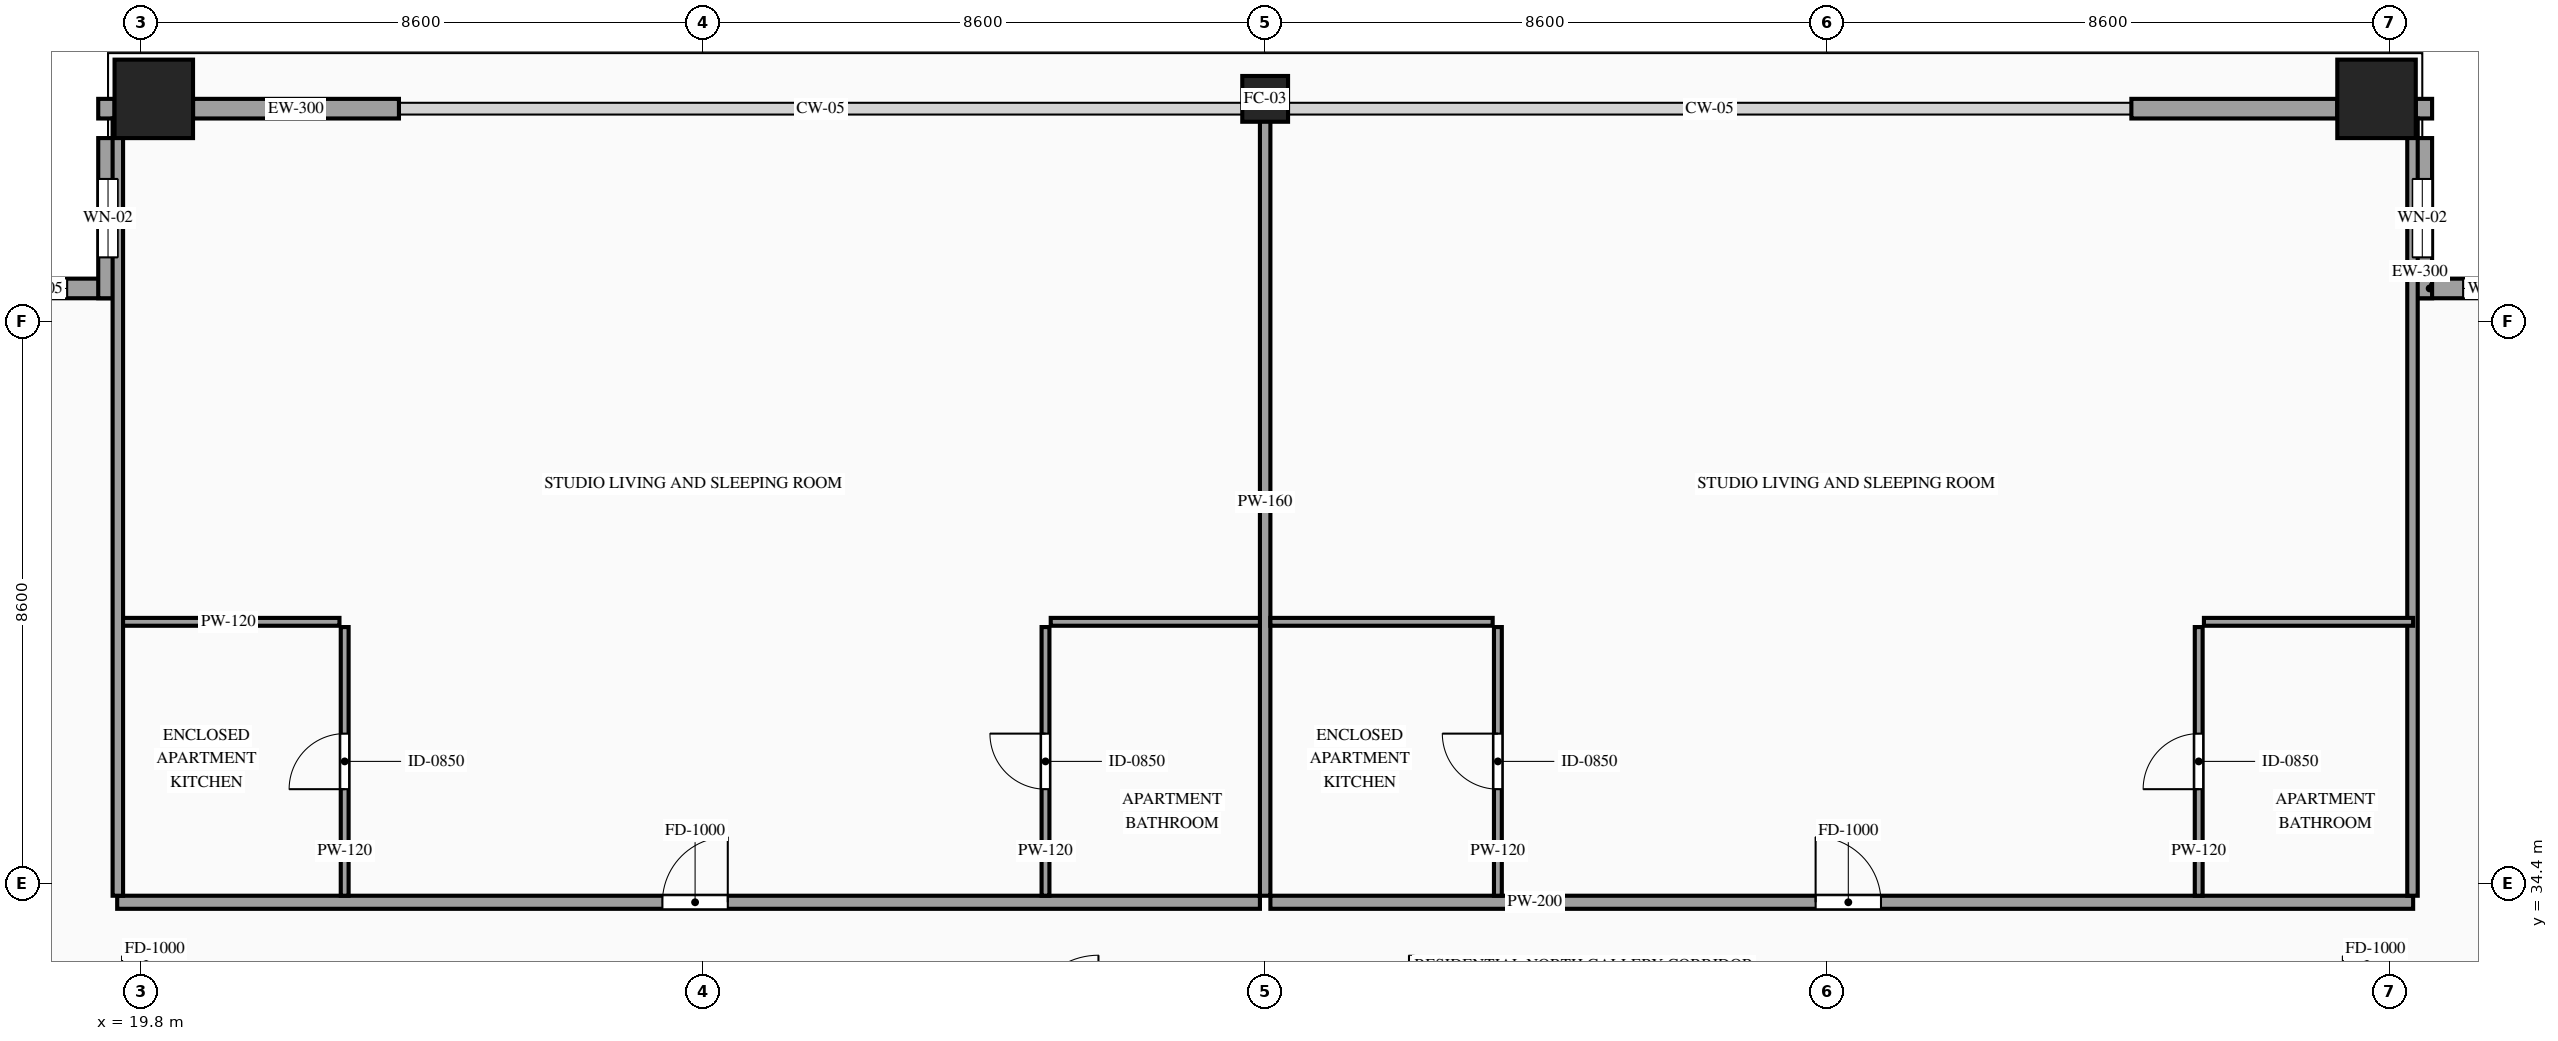
"""IFC4 building model, lengths in metres.
Left out: names, types, materials, properties, quantities, classifications, styles, units other than length and angle.
Written with IfcOpenShell. Run it as: python <this file> out.ifc"""

import sys

from ifc_helpers import new_model, si_unit, direction, frame, frame_2d, origin, origin_2d, place, context, subcontext, project, spatial, rectangle, hollow_rectangle, extrude, source, transform, mapped, element, fill, save


model = new_model("IFC4")
c1 = context("Model", 3, precision=1e-05, world=origin(), true_north=direction((0.0, 1.0)))
c2 = subcontext(c1, "Body", "Model", "MODEL_VIEW")
j1 = project(units=[si_unit("LENGTHUNIT", "METRE"), si_unit("PLANEANGLEUNIT", "RADIAN")], contexts=[c1])
p1 = place(None, origin())
s1 = spatial("IfcSite", under=j1, at=p1, CompositionType="ELEMENT")
p2 = place(p1, origin())
s2 = spatial("IfcBuilding", under=s1, at=p2, CompositionType="ELEMENT")
p3 = place(p2, frame((0.0, 0.0, 231.1)))
s3 = spatial("IfcBuildingStorey", under=s2, at=p3, CompositionType="ELEMENT", Elevation=231.1)
m1 = source(origin(), c2, "Body", "SweptSolid", [
    extrude(hollow_rectangle(XDim=1.2, YDim=1.2, WallThickness=0.055, at=origin_2d()), origin(), (0.0, 0.0, 1.0), 3.5),
])
p4 = place(p3, frame((20.0, 46.4, 0.0), z_axis=(0.0, 0.0, 1.0), x_axis=(1.0, 0.0, 0.0)))
e1 = element("IfcColumn", 1, at=p4, inside=s3, PredefinedType="COLUMN", context=c2, shape_type="MappedRepresentation", body=[
    mapped(m1, transform((0.0, 0.0, 0.0), scale=1.0)),
])
m2 = source(origin(), c2, "Body", "SweptSolid", [
    extrude(hollow_rectangle(XDim=0.7, YDim=0.7, WallThickness=0.032, at=origin_2d()), origin(), (0.0, 0.0, 1.0), 3.5),
])
p5 = place(p3, frame((37.0, 46.4, 0.0), z_axis=(0.0, 0.0, 1.0), x_axis=(1.0, 0.0, 0.0)))
e2 = element("IfcColumn", 2, at=p5, inside=s3, PredefinedType="COLUMN", context=c2, shape_type="MappedRepresentation", body=[
    mapped(m2, transform((0.0, 0.0, 0.0), scale=1.0)),
])
p6 = place(p3, frame((54.0, 46.4, 0.0), z_axis=(0.0, 0.0, 1.0), x_axis=(1.0, 0.0, 0.0)))
e3 = element("IfcColumn", 3, at=p6, inside=s3, PredefinedType="COLUMN", context=c2, shape_type="MappedRepresentation", body=[
    mapped(m1, transform((0.0, 0.0, 0.0), scale=1.0)),
])
p7 = place(p3, frame((19.45, 43.5, 0.0), z_axis=(0.0, 0.0, 1.0), x_axis=(-1.0, 0.0, 0.0)))
e4 = element("IfcWall", 4, at=p7, inside=s3, PredefinedType="SOLIDWALL", context=c2, shape_type="SweptSolid", body=[
    extrude(rectangle(XDim=2.45, YDim=0.3, at=frame_2d((1.225, 0.0))), origin(), (0.0, 0.0, 1.0), 3.28),
])
p8 = place(p7, frame((0.775, 0.0, 0.85)))
e5 = element("IfcOpeningElement", 5, at=p8, cuts=e4, PredefinedType="OPENING", context=c2, shape_type="SweptSolid", body=[
    extrude(rectangle(XDim=0.9, YDim=1.5, at=frame_2d((0.45, 0.75))), frame((0.0, 0.165, 0.0), z_axis=(0.0, -1.0, 0.0), x_axis=(1.0, 0.0, 0.0)), (0.0, 0.0, 1.0), 0.33),
])
p9 = place(p3, frame((19.3, 45.8, 0.0), z_axis=(0.0, 0.0, 1.0), x_axis=(0.0, -1.0, 0.0)))
e6 = element("IfcWall", 6, at=p9, inside=s3, PredefinedType="SOLIDWALL", context=c2, shape_type="SweptSolid", body=[
    extrude(rectangle(XDim=2.45, YDim=0.3, at=frame_2d((1.225, 0.0))), origin(), (0.0, 0.0, 1.0), 3.28),
])
p10 = place(p9, frame((0.625, 0.0, 0.85)))
e7 = element("IfcOpeningElement", 7, at=p10, cuts=e6, PredefinedType="OPENING", context=c2, shape_type="SweptSolid", body=[
    extrude(rectangle(XDim=1.2, YDim=2.1, at=frame_2d((0.6, 1.05))), frame((0.0, 0.165, 0.0), z_axis=(0.0, -1.0, 0.0), x_axis=(1.0, 0.0, 0.0)), (0.0, 0.0, 1.0), 0.33),
])
p11 = place(p3, frame((57.0, 43.5, 0.0), z_axis=(0.0, 0.0, 1.0), x_axis=(-1.0, 0.0, 0.0)))
e8 = element("IfcWall", 8, at=p11, inside=s3, PredefinedType="SOLIDWALL", context=c2, shape_type="SweptSolid", body=[
    extrude(rectangle(XDim=2.45, YDim=0.3, at=frame_2d((1.225, 0.0))), origin(), (0.0, 0.0, 1.0), 3.28),
])
p12 = place(p11, frame((0.775, 0.0, 0.85)))
e9 = element("IfcOpeningElement", 9, at=p12, cuts=e8, PredefinedType="OPENING", context=c2, shape_type="SweptSolid", body=[
    extrude(rectangle(XDim=0.9, YDim=1.5, at=frame_2d((0.45, 0.75))), frame((0.0, 0.165, 0.0), z_axis=(0.0, -1.0, 0.0), x_axis=(1.0, 0.0, 0.0)), (0.0, 0.0, 1.0), 0.33),
])
p13 = place(p3, frame((54.7, 43.35, 0.0), z_axis=(0.0, 0.0, 1.0), x_axis=(0.0, 1.0, 0.0)))
e10 = element("IfcWall", 10, at=p13, inside=s3, PredefinedType="SOLIDWALL", context=c2, shape_type="SweptSolid", body=[
    extrude(rectangle(XDim=2.45, YDim=0.3, at=frame_2d((1.225, 0.0))), origin(), (0.0, 0.0, 1.0), 3.28),
])
p14 = place(p13, frame((0.625, 0.0, 0.85)))
e11 = element("IfcOpeningElement", 11, at=p14, cuts=e10, PredefinedType="OPENING", context=c2, shape_type="SweptSolid", body=[
    extrude(rectangle(XDim=1.2, YDim=2.1, at=frame_2d((0.6, 1.05))), frame((0.0, 0.165, 0.0), z_axis=(0.0, -1.0, 0.0), x_axis=(1.0, 0.0, 0.0)), (0.0, 0.0, 1.0), 0.33),
])
m3 = source(origin(), c2, "Body", "SweptSolid", [
    extrude(rectangle(XDim=0.25, YDim=0.3, at=frame_2d((0.125, 0.0))), origin(), (0.0, 0.0, 1.0), 3.28),
])
for number, where, z_axis, x_axis in (
    (12, (19.15, 46.25, 0.0), (0.0, 0.0, 1.0), (1.0, 0.0, 0.0)),
    (13, (54.6, 46.25, 0.0), (0.0, 0.0, 1.0), (1.0, 0.0, 0.0)),
):
    element("IfcWall", number, at=place(p3, frame(where, z_axis=z_axis, x_axis=x_axis)), inside=s3, PredefinedType="SOLIDWALL", context=c2, shape_type="MappedRepresentation", body=[
        mapped(m3, transform((0.0, 0.0, 0.0), scale=1.0)),
    ])
m4 = source(origin(), c2, "Body", "SweptSolid", [
    extrude(rectangle(XDim=3.15, YDim=0.3, at=frame_2d((1.575, 0.0))), origin(), (0.0, 0.0, 1.0), 2.835),
])
for number, where, z_axis, x_axis in (
    (14, (20.6, 46.25, 0.0), (0.0, 0.0, 1.0), (1.0, 0.0, 0.0)),
    (15, (50.25, 46.25, 0.0), (0.0, 0.0, 1.0), (1.0, 0.0, 0.0)),
):
    element("IfcWall", number, at=place(p3, frame(where, z_axis=z_axis, x_axis=x_axis)), inside=s3, PredefinedType="SOLIDWALL", context=c2, shape_type="MappedRepresentation", body=[
        mapped(m4, transform((0.0, 0.0, 0.0), scale=1.0)),
    ])
p15 = place(p3, frame((19.44, 34.11, 0.0), z_axis=(0.0, 0.0, 1.0), x_axis=(1.0, 0.0, 0.0)))
e16 = element("IfcWall", 16, at=p15, inside=s3, PredefinedType="PARTITIONING", context=c2, shape_type="SweptSolid", body=[
    extrude(rectangle(XDim=17.48, YDim=0.2, at=frame_2d((8.74, 0.0))), origin(), (0.0, 0.0, 1.0), 3.28),
])
p16 = place(p15, frame((8.34, 0.0, 0.0)))
e17 = element("IfcOpeningElement", 17, at=p16, cuts=e16, PredefinedType="OPENING", context=c2, shape_type="SweptSolid", body=[
    extrude(rectangle(XDim=1.0, YDim=2.2, at=frame_2d((0.5, 1.1))), frame((0.0, 0.115, 0.0), z_axis=(0.0, -1.0, 0.0), x_axis=(1.0, 0.0, 0.0)), (0.0, 0.0, 1.0), 0.23),
])
m5 = source(origin(), c2, "Body", "SweptSolid", [
    extrude(rectangle(XDim=12.04, YDim=0.16, at=frame_2d((6.02, 0.0))), origin(), (0.0, 0.0, 1.0), 2.787),
])
p17 = place(p3, frame((37.0, 34.21, 0.0), z_axis=(0.0, 0.0, 1.0), x_axis=(0.0, 1.0, 0.0)))
e18 = element("IfcWall", 18, at=p17, inside=s3, PredefinedType="PARTITIONING", context=c2, shape_type="MappedRepresentation", body=[
    mapped(m5, transform((0.0, 0.0, 0.0), scale=1.0)),
])
m6 = source(origin(), c2, "Body", "SweptSolid", [
    extrude(rectangle(XDim=3.4, YDim=0.12, at=frame_2d((1.7, 0.0))), origin(), (0.0, 0.0, 1.0), 3.28),
])
p18 = place(p3, frame((19.44, 38.4, 0.0), z_axis=(0.0, 0.0, 1.0), x_axis=(1.0, 0.0, 0.0)))
e19 = element("IfcWall", 19, at=p18, inside=s3, PredefinedType="PARTITIONING", context=c2, shape_type="MappedRepresentation", body=[
    mapped(m6, transform((0.0, 0.0, 0.0), scale=1.0)),
])
p19 = place(p3, frame((22.92, 34.21, 0.0), z_axis=(0.0, 0.0, 1.0), x_axis=(0.0, 1.0, 0.0)))
e20 = element("IfcWall", 20, at=p19, inside=s3, PredefinedType="PARTITIONING", context=c2, shape_type="SweptSolid", body=[
    extrude(rectangle(XDim=4.11, YDim=0.12, at=frame_2d((2.055, 0.0))), origin(), (0.0, 0.0, 1.0), 3.28),
])
p20 = place(p19, frame((1.63, 0.0, 0.0)))
e21 = element("IfcOpeningElement", 21, at=p20, cuts=e20, PredefinedType="OPENING", context=c2, shape_type="SweptSolid", body=[
    extrude(rectangle(XDim=0.85, YDim=2.1, at=frame_2d((0.425, 1.05))), frame((0.0, 0.075, 0.0), z_axis=(0.0, -1.0, 0.0), x_axis=(1.0, 0.0, 0.0)), (0.0, 0.0, 1.0), 0.15),
])
m7 = source(origin(), c2, "Body", "SweptSolid", [
    extrude(rectangle(XDim=3.2, YDim=0.12, at=frame_2d((1.6, 0.0))), origin(), (0.0, 0.0, 1.0), 3.28),
])
p21 = place(p3, frame((33.72, 38.4, 0.0), z_axis=(0.0, 0.0, 1.0), x_axis=(1.0, 0.0, 0.0)))
e22 = element("IfcWall", 22, at=p21, inside=s3, PredefinedType="PARTITIONING", context=c2, shape_type="MappedRepresentation", body=[
    mapped(m7, transform((0.0, 0.0, 0.0), scale=1.0)),
])
p22 = place(p3, frame((33.64, 34.21, 0.0), z_axis=(0.0, 0.0, 1.0), x_axis=(0.0, 1.0, 0.0)))
e23 = element("IfcWall", 23, at=p22, inside=s3, PredefinedType="PARTITIONING", context=c2, shape_type="SweptSolid", body=[
    extrude(rectangle(XDim=4.11, YDim=0.12, at=frame_2d((2.055, 0.0))), origin(), (0.0, 0.0, 1.0), 3.28),
])
p23 = place(p22, frame((1.63, 0.0, 0.0)))
e24 = element("IfcOpeningElement", 24, at=p23, cuts=e23, PredefinedType="OPENING", context=c2, shape_type="SweptSolid", body=[
    extrude(rectangle(XDim=0.85, YDim=2.1, at=frame_2d((0.425, 1.05))), frame((0.0, 0.075, 0.0), z_axis=(0.0, -1.0, 0.0), x_axis=(1.0, 0.0, 0.0)), (0.0, 0.0, 1.0), 0.15),
])
p24 = place(p3, frame((37.08, 34.11, 0.0), z_axis=(0.0, 0.0, 1.0), x_axis=(1.0, 0.0, 0.0)))
e25 = element("IfcWall", 25, at=p24, inside=s3, PredefinedType="PARTITIONING", context=c2, shape_type="SweptSolid", body=[
    extrude(rectangle(XDim=17.48, YDim=0.2, at=frame_2d((8.74, 0.0))), origin(), (0.0, 0.0, 1.0), 3.28),
])
p25 = place(p24, frame((8.34, 0.0, 0.0)))
e26 = element("IfcOpeningElement", 26, at=p25, cuts=e25, PredefinedType="OPENING", context=c2, shape_type="SweptSolid", body=[
    extrude(rectangle(XDim=1.0, YDim=2.2, at=frame_2d((0.5, 1.1))), frame((0.0, 0.115, 0.0), z_axis=(0.0, -1.0, 0.0), x_axis=(1.0, 0.0, 0.0)), (0.0, 0.0, 1.0), 0.23),
])
m8 = source(origin(), c2, "Body", "SweptSolid", [
    extrude(rectangle(XDim=11.89, YDim=0.16, at=frame_2d((5.945, 0.0))), origin(), (0.0, 0.0, 1.0), 3.28),
])
for number, where, z_axis, x_axis in (
    (27, (19.45, 34.21, 0.0), (0.0, 0.0, 1.0), (0.0, 1.0, 0.0)),
    (28, (54.55, 34.21, 0.0), (0.0, 0.0, 1.0), (0.0, 1.0, 0.0)),
):
    element("IfcWall", number, at=place(p3, frame(where, z_axis=z_axis, x_axis=x_axis)), inside=s3, PredefinedType="PARTITIONING", context=c2, shape_type="MappedRepresentation", body=[
        mapped(m8, transform((0.0, 0.0, 0.0), scale=1.0)),
    ])
m9 = source(origin(), c2, "Body", "SweptSolid", [
    extrude(rectangle(XDim=3.4, YDim=0.12, at=frame_2d((1.7, 0.0))), origin(), (0.0, 0.0, 1.0), 3.28),
])
p26 = place(p3, frame((37.08, 38.4, 0.0), z_axis=(0.0, 0.0, 1.0), x_axis=(1.0, 0.0, 0.0)))
e29 = element("IfcWall", 29, at=p26, inside=s3, PredefinedType="PARTITIONING", context=c2, shape_type="MappedRepresentation", body=[
    mapped(m9, transform((0.0, 0.0, 0.0), scale=1.0)),
])
p27 = place(p3, frame((40.56, 34.21, 0.0), z_axis=(0.0, 0.0, 1.0), x_axis=(0.0, 1.0, 0.0)))
e30 = element("IfcWall", 30, at=p27, inside=s3, PredefinedType="PARTITIONING", context=c2, shape_type="SweptSolid", body=[
    extrude(rectangle(XDim=4.11, YDim=0.12, at=frame_2d((2.055, 0.0))), origin(), (0.0, 0.0, 1.0), 3.28),
])
p28 = place(p27, frame((1.63, 0.0, 0.0)))
e31 = element("IfcOpeningElement", 31, at=p28, cuts=e30, PredefinedType="OPENING", context=c2, shape_type="SweptSolid", body=[
    extrude(rectangle(XDim=0.85, YDim=2.1, at=frame_2d((0.425, 1.05))), frame((0.0, 0.075, 0.0), z_axis=(0.0, -1.0, 0.0), x_axis=(1.0, 0.0, 0.0)), (0.0, 0.0, 1.0), 0.15),
])
p29 = place(p3, frame((51.36, 38.4, 0.0), z_axis=(0.0, 0.0, 1.0), x_axis=(1.0, 0.0, 0.0)))
e32 = element("IfcWall", 32, at=p29, inside=s3, PredefinedType="PARTITIONING", context=c2, shape_type="MappedRepresentation", body=[
    mapped(m7, transform((0.0, 0.0, 0.0), scale=1.0)),
])
p30 = place(p3, frame((51.28, 34.21, 0.0), z_axis=(0.0, 0.0, 1.0), x_axis=(0.0, 1.0, 0.0)))
e33 = element("IfcWall", 33, at=p30, inside=s3, PredefinedType="PARTITIONING", context=c2, shape_type="SweptSolid", body=[
    extrude(rectangle(XDim=4.11, YDim=0.12, at=frame_2d((2.055, 0.0))), origin(), (0.0, 0.0, 1.0), 3.28),
])
p31 = place(p30, frame((1.63, 0.0, 0.0)))
e34 = element("IfcOpeningElement", 34, at=p31, cuts=e33, PredefinedType="OPENING", context=c2, shape_type="SweptSolid", body=[
    extrude(rectangle(XDim=0.85, YDim=2.1, at=frame_2d((0.425, 1.05))), frame((0.0, 0.075, 0.0), z_axis=(0.0, -1.0, 0.0), x_axis=(1.0, 0.0, 0.0)), (0.0, 0.0, 1.0), 0.15),
])
m10 = source(origin(), c2, "Body", "SweptSolid", [
    extrude(rectangle(XDim=0.9, YDim=1.5, at=frame_2d((0.45, 0.75))), frame((0.0, 0.03, 0.0), z_axis=(0.0, -1.0, 0.0), x_axis=(1.0, 0.0, 0.0)), (0.0, 0.0, 1.0), 0.06),
])
p32 = place(p8, origin())
e35 = element("IfcWindow", 35, at=p32, inside=s3, PartitioningType="SINGLE_PANEL", PredefinedType="WINDOW", context=c2, shape_type="MappedRepresentation", body=[
    mapped(m10, transform((0.0, 0.0, 0.0), scale=1.0)),
])
fill(e5, e35)
m11 = source(origin(), c2, "Body", "SweptSolid", [
    extrude(rectangle(XDim=1.2, YDim=2.1, at=frame_2d((0.6, 1.05))), frame((0.0, 0.03, 0.0), z_axis=(0.0, -1.0, 0.0), x_axis=(1.0, 0.0, 0.0)), (0.0, 0.0, 1.0), 0.06),
])
p33 = place(p10, origin())
e36 = element("IfcWindow", 36, at=p33, inside=s3, PartitioningType="SINGLE_PANEL", PredefinedType="WINDOW", context=c2, shape_type="MappedRepresentation", body=[
    mapped(m11, transform((0.0, 0.0, 0.0), scale=1.0)),
])
fill(e7, e36)
p34 = place(p12, origin())
e37 = element("IfcWindow", 37, at=p34, inside=s3, PartitioningType="SINGLE_PANEL", PredefinedType="WINDOW", context=c2, shape_type="MappedRepresentation", body=[
    mapped(m10, transform((0.0, 0.0, 0.0), scale=1.0)),
])
fill(e9, e37)
p35 = place(p14, origin())
e38 = element("IfcWindow", 38, at=p35, inside=s3, PartitioningType="SINGLE_PANEL", PredefinedType="WINDOW", context=c2, shape_type="MappedRepresentation", body=[
    mapped(m11, transform((0.0, 0.0, 0.0), scale=1.0)),
])
fill(e11, e38)
m12 = source(origin(), c2, "Body", "SweptSolid", [
    extrude(rectangle(XDim=1.0, YDim=2.2, at=frame_2d((0.5, 1.1))), frame((0.0, 0.025, 0.0), z_axis=(0.0, -1.0, 0.0), x_axis=(1.0, 0.0, 0.0)), (0.0, 0.0, 1.0), 0.05),
])
p36 = place(p16, origin())
e39 = element("IfcDoor", 39, at=p36, inside=s3, OperationType="SINGLE_SWING_RIGHT", PredefinedType="DOOR", context=c2, shape_type="MappedRepresentation", body=[
    mapped(m12, transform((0.0, 0.0, 0.0), scale=1.0)),
])
fill(e17, e39)
m13 = source(origin(), c2, "Body", "SweptSolid", [
    extrude(rectangle(XDim=0.85, YDim=2.1, at=frame_2d((0.425, 1.05))), frame((0.0, 0.025, 0.0), z_axis=(0.0, -1.0, 0.0), x_axis=(1.0, 0.0, 0.0)), (0.0, 0.0, 1.0), 0.05),
])
p37 = place(p20, origin())
e40 = element("IfcDoor", 40, at=p37, inside=s3, OperationType="SINGLE_SWING_LEFT", PredefinedType="DOOR", context=c2, shape_type="MappedRepresentation", body=[
    mapped(m13, transform((0.0, 0.0, 0.0), scale=1.0)),
])
fill(e21, e40)
p38 = place(p23, origin())
e41 = element("IfcDoor", 41, at=p38, inside=s3, OperationType="SINGLE_SWING_RIGHT", PredefinedType="DOOR", context=c2, shape_type="MappedRepresentation", body=[
    mapped(m13, transform((0.0, 0.0, 0.0), scale=1.0)),
])
fill(e24, e41)
p39 = place(p25, origin())
e42 = element("IfcDoor", 42, at=p39, inside=s3, OperationType="SINGLE_SWING_LEFT", PredefinedType="DOOR", context=c2, shape_type="MappedRepresentation", body=[
    mapped(m12, transform((0.0, 0.0, 0.0), scale=1.0)),
])
fill(e26, e42)
p40 = place(p28, origin())
e43 = element("IfcDoor", 43, at=p40, inside=s3, OperationType="SINGLE_SWING_RIGHT", PredefinedType="DOOR", context=c2, shape_type="MappedRepresentation", body=[
    mapped(m13, transform((0.0, 0.0, 0.0), scale=1.0)),
])
fill(e31, e43)
p41 = place(p31, origin())
e44 = element("IfcDoor", 44, at=p41, inside=s3, OperationType="SINGLE_SWING_LEFT", PredefinedType="DOOR", context=c2, shape_type="MappedRepresentation", body=[
    mapped(m13, transform((0.0, 0.0, 0.0), scale=1.0)),
])
fill(e34, e44)
save(model, sys.argv[1])
